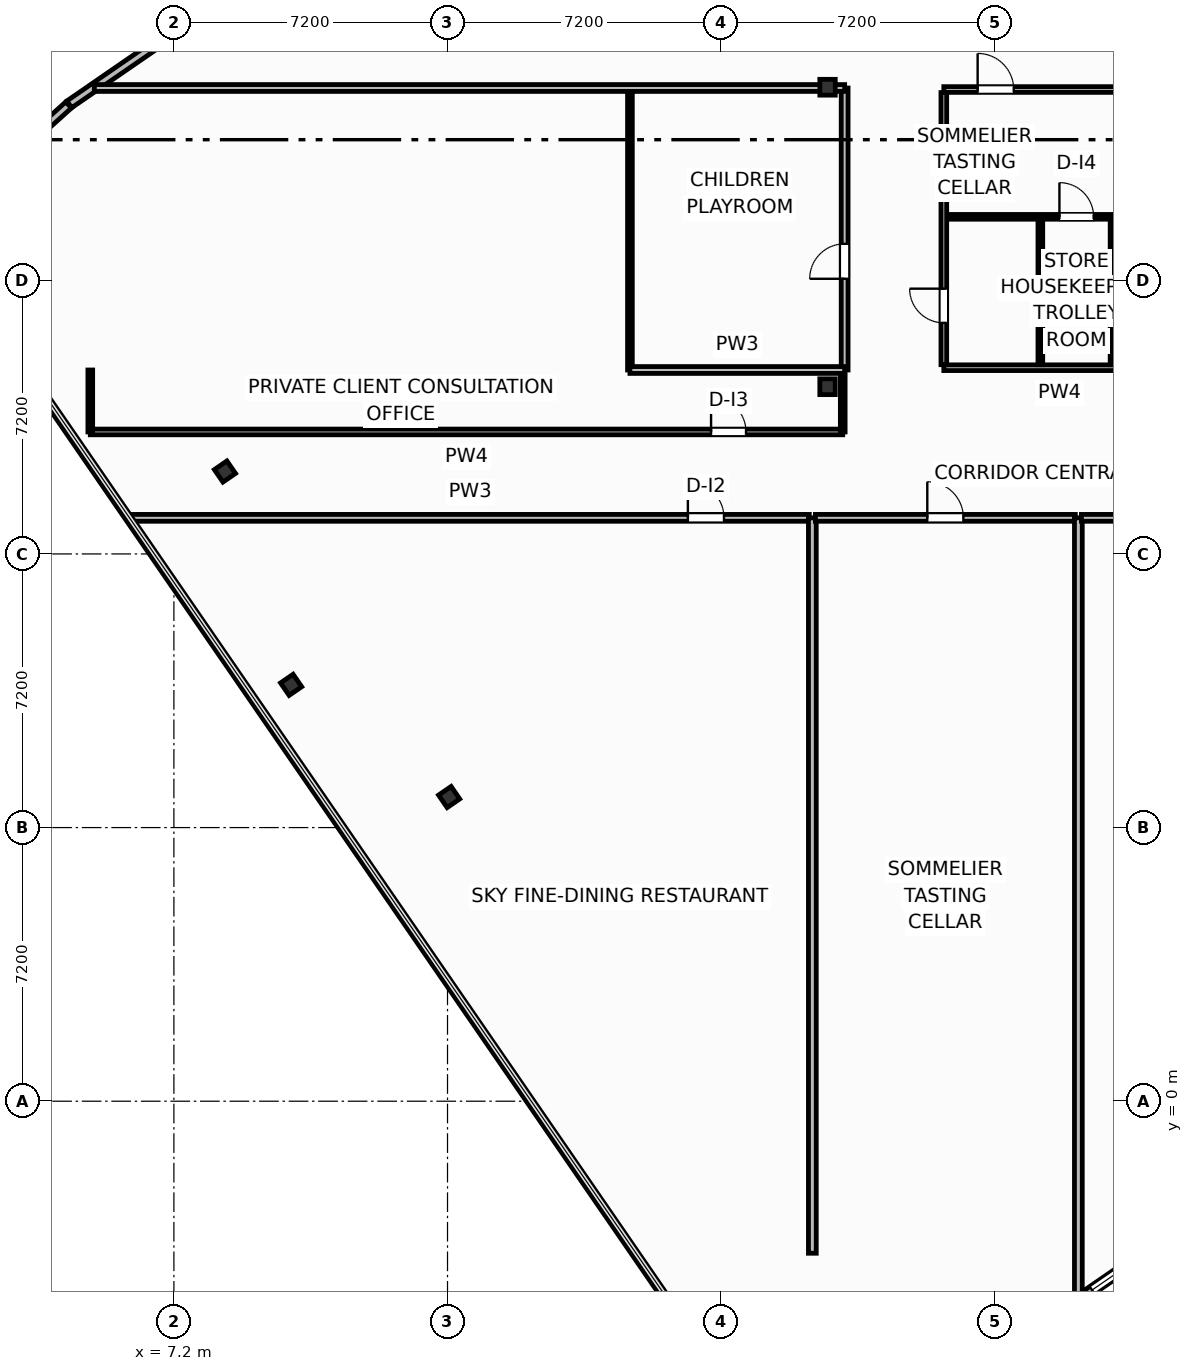
"""IFC4 building model, lengths in metres.
Left out: names, types, materials, properties, quantities, classifications, styles, units other than length and angle.
Written with IfcOpenShell. Run it as: python <this file> out.ifc"""

import sys

from ifc_helpers import new_model, si_unit, direction, frame, frame_2d, origin, origin_2d, place, context, subcontext, project, spatial, rectangle, i_section, extrude, element, fill, save


model = new_model("IFC4")
c1 = context("Model", 3, precision=1e-05, world=origin(), true_north=direction((0.0, 1.0)))
c2 = subcontext(c1, "Body", "Model", "MODEL_VIEW")
j1 = project(units=[si_unit("LENGTHUNIT", "METRE"), si_unit("PLANEANGLEUNIT", "RADIAN")], contexts=[c1])
p1 = place(None, origin())
s1 = spatial("IfcSite", under=j1, at=p1, CompositionType="ELEMENT")
p2 = place(p1, origin())
s2 = spatial("IfcBuilding", under=s1, at=p2, CompositionType="ELEMENT")
p3 = place(p2, frame((0.0, 0.0, 258.2)))
s3 = spatial("IfcBuildingStorey", under=s2, at=p3, CompositionType="ELEMENT", Elevation=258.2)
for number, where, z_axis, x_axis in (
    (1, (24.4, 18.8, 0.0), (0.0, 0.0, 1.0), (1.0, 0.0, 0.0)),
    (2, (24.4, 26.68, 0.0), (0.0, 0.0, 1.0), (1.0, 0.0, 0.0)),
):
    element("IfcColumn", number, at=place(p3, frame(where, z_axis=z_axis, x_axis=x_axis)), inside=s3, PredefinedType="COLUMN", context=c2, shape_type="SweptSolid", body=[
        extrude(i_section(OverallWidth=0.406, OverallDepth=0.416, WebThickness=0.03, FlangeThickness=0.048, FilletRadius=0.025, at=origin_2d()), origin(), (0.0, 0.0, 1.0), 3.7),
    ])
for number, where, z_axis, x_axis in (
    (3, (8.543, 16.569, 0.0), (0.0, 0.0, 1.0), (0.824, 0.567, 0.0)),
    (4, (10.284, 10.956, 0.0), (0.0, 0.0, 1.0), (0.824, 0.567, 0.0)),
    (5, (14.443, 8.004, 0.0), (0.0, 0.0, 1.0), (0.824, 0.567, 0.0)),
):
    element("IfcColumn", number, at=place(p3, frame(where, z_axis=z_axis, x_axis=x_axis)), inside=s3, PredefinedType="COLUMN", context=c2, shape_type="SweptSolid", body=[
        extrude(i_section(OverallWidth=0.401, OverallDepth=0.399, WebThickness=0.025, FlangeThickness=0.04, FilletRadius=0.022, at=origin_2d()), origin(), (0.0, 0.0, 1.0), 3.7),
    ])
p4 = place(p3, frame((27.704, -7.488, 0.0), z_axis=(0.0, 0.0, 1.0), x_axis=(0.823529068157, 0.567274073003, 0.0)))
e6 = element("IfcWall", 6, at=p4, inside=s3, PredefinedType="SOLIDWALL", context=c2, shape_type="SweptSolid", body=[
    extrude(rectangle(XDim=10.98, YDim=0.22, at=frame_2d((5.49, 0.0))), origin(), (0.0, 0.0, 1.0), 2.73),
])
p5 = place(p4, frame((4.44, 0.0, 0.8)))
e7 = element("IfcOpeningElement", 7, at=p5, cuts=e6, PredefinedType="OPENING", context=c2, shape_type="SweptSolid", body=[
    extrude(rectangle(XDim=2.1, YDim=1.75, at=frame_2d((1.05, 0.875))), frame((0.0, 0.12, 0.0), z_axis=(0.0, -1.0, 0.0), x_axis=(1.0, 0.0, 0.0)), (0.0, 0.0, 1.0), 0.24),
])
p6 = place(p3, frame((13.408, 32.402, 0.0), z_axis=(0.0, 0.0, 1.0), x_axis=(-0.823527634633, -0.567276154087, 0.0)))
e8 = element("IfcWall", 8, at=p6, inside=s3, PredefinedType="SOLIDWALL", context=c2, shape_type="SweptSolid", body=[
    extrude(rectangle(XDim=10.88, YDim=0.22, at=frame_2d((5.44, 0.0))), origin(), (0.0, 0.0, 1.0), 2.73),
])
p7 = place(p6, frame((4.39, 0.0, 0.8)))
e9 = element("IfcOpeningElement", 9, at=p7, cuts=e8, PredefinedType="OPENING", context=c2, shape_type="SweptSolid", body=[
    extrude(rectangle(XDim=2.1, YDim=1.75, at=frame_2d((1.05, 0.875))), frame((0.0, 0.12, 0.0), z_axis=(0.0, -1.0, 0.0), x_axis=(1.0, 0.0, 0.0)), (0.0, 0.0, 1.0), 0.24),
])
p8 = place(p3, frame((4.429, 26.213, 0.0), z_axis=(0.0, 0.0, 1.0), x_axis=(-0.742414330744, -0.669941013453, 0.0)))
e10 = element("IfcWall", 10, at=p8, inside=s3, PredefinedType="SOLIDWALL", context=c2, shape_type="SweptSolid", body=[
    extrude(rectangle(XDim=1.257, YDim=0.22, at=frame_2d((0.628, 0.0))), origin(), (0.0, 0.0, 1.0), 2.73),
])
p9 = place(p3, frame((5.0, 17.61, 0.0), z_axis=(0.0, 0.0, 1.0), x_axis=(1.0, 0.0, 0.0)))
e11 = element("IfcWall", 11, at=p9, inside=s3, PredefinedType="PARTITIONING", context=c2, shape_type="SweptSolid", body=[
    extrude(rectangle(XDim=19.8, YDim=0.15, at=frame_2d((9.9, 0.0))), origin(), (0.0, 0.0, 1.0), 2.739),
])
p10 = place(p9, frame((16.335, 0.0, 0.0)))
e12 = element("IfcOpeningElement", 12, at=p10, cuts=e11, PredefinedType="OPENING", context=c2, shape_type="SweptSolid", body=[
    extrude(rectangle(XDim=0.92, YDim=2.05, at=frame_2d((0.46, 1.025))), frame((0.0, 0.085, 0.0), z_axis=(0.0, -1.0, 0.0), x_axis=(1.0, 0.0, 0.0)), (0.0, 0.0, 1.0), 0.17),
])
for number, where, z_axis, x_axis in (
    (13, (5.0, 17.61, 0.0), (0.0, 0.0, 1.0), (0.0, 1.0, 0.0)),
    (14, (24.8, 17.61, 0.0), (0.0, 0.0, 1.0), (0.0, 1.0, 0.0)),
):
    element("IfcWall", number, at=place(p3, frame(where, z_axis=z_axis, x_axis=x_axis)), inside=s3, PredefinedType="PARTITIONING", context=c2, shape_type="SweptSolid", body=[
        extrude(rectangle(XDim=1.63, YDim=0.125, at=frame_2d((0.815, 0.0))), origin(), (0.0, 0.0, 1.0), 3.45),
    ])
p11 = place(p3, frame((6.071, 15.35, 0.0), z_axis=(0.0, 0.0, 1.0), x_axis=(1.0, 0.0, 0.0)))
e15 = element("IfcWall", 15, at=p11, inside=s3, PredefinedType="PARTITIONING", context=c2, shape_type="SweptSolid", body=[
    extrude(rectangle(XDim=17.849, YDim=0.18, at=frame_2d((8.924, 0.0))), origin(), (0.0, 0.0, 1.0), 3.45),
])
p12 = place(p11, frame((14.654, 0.0, 0.0)))
e16 = element("IfcOpeningElement", 16, at=p12, cuts=e15, PredefinedType="OPENING", context=c2, shape_type="SweptSolid", body=[
    extrude(rectangle(XDim=0.95, YDim=2.05, at=frame_2d((0.475, 1.025))), frame((0.0, 0.1, 0.0), z_axis=(0.0, -1.0, 0.0), x_axis=(1.0, 0.0, 0.0)), (0.0, 0.0, 1.0), 0.2),
])
p13 = place(p3, frame((24.0, -4.0, 0.0), z_axis=(0.0, 0.0, 1.0), x_axis=(0.0, 1.0, 0.0)))
e17 = element("IfcWall", 17, at=p13, inside=s3, PredefinedType="PARTITIONING", context=c2, shape_type="SweptSolid", body=[
    extrude(rectangle(XDim=19.35, YDim=0.205, at=frame_2d((9.675, 0.0))), origin(), (0.0, 0.0, 1.0), 3.45),
])
p14 = place(p3, frame((24.08, 15.35, 0.0), z_axis=(0.0, 0.0, 1.0), x_axis=(1.0, 0.0, 0.0)))
e18 = element("IfcWall", 18, at=p14, inside=s3, PredefinedType="PARTITIONING", context=c2, shape_type="SweptSolid", body=[
    extrude(rectangle(XDim=6.84, YDim=0.18, at=frame_2d((3.42, 0.0))), origin(), (0.0, 0.0, 1.0), 3.45),
])
p15 = place(p14, frame((2.945, 0.0, 0.0)))
e19 = element("IfcOpeningElement", 19, at=p15, cuts=e18, PredefinedType="OPENING", context=c2, shape_type="SweptSolid", body=[
    extrude(rectangle(XDim=0.95, YDim=2.05, at=frame_2d((0.475, 1.025))), frame((0.0, 0.1, 0.0), z_axis=(0.0, -1.0, 0.0), x_axis=(1.0, 0.0, 0.0)), (0.0, 0.0, 1.0), 0.2),
])
p16 = place(p3, frame((31.0, -5.112, 0.0), z_axis=(0.0, 0.0, 1.0), x_axis=(0.0, 1.0, 0.0)))
e20 = element("IfcWall", 20, at=p16, inside=s3, PredefinedType="PARTITIONING", context=c2, shape_type="SweptSolid", body=[
    extrude(rectangle(XDim=20.462, YDim=0.205, at=frame_2d((10.231, 0.0))), origin(), (0.0, 0.0, 1.0), 3.45),
])
p17 = place(p3, frame((31.08, 15.35, 0.0), z_axis=(0.0, 0.0, 1.0), x_axis=(1.0, 0.0, 0.0)))
e21 = element("IfcWall", 21, at=p17, inside=s3, PredefinedType="PARTITIONING", context=c2, shape_type="SweptSolid", body=[
    extrude(rectangle(XDim=6.84, YDim=0.18, at=frame_2d((3.42, 0.0))), origin(), (0.0, 0.0, 1.0), 3.45),
])
p18 = place(p17, frame((2.945, 0.0, 0.0)))
e22 = element("IfcOpeningElement", 22, at=p18, cuts=e21, PredefinedType="OPENING", context=c2, shape_type="SweptSolid", body=[
    extrude(rectangle(XDim=0.95, YDim=2.05, at=frame_2d((0.475, 1.025))), frame((0.0, 0.1, 0.0), z_axis=(0.0, -1.0, 0.0), x_axis=(1.0, 0.0, 0.0)), (0.0, 0.0, 1.0), 0.2),
])
p19 = place(p3, frame((24.85, 19.24, 0.0), z_axis=(0.0, 0.0, 1.0), x_axis=(0.0, 1.0, 0.0)))
e23 = element("IfcWall", 23, at=p19, inside=s3, PredefinedType="PARTITIONING", context=c2, shape_type="SweptSolid", body=[
    extrude(rectangle(XDim=7.42, YDim=0.18, at=frame_2d((3.71, 0.0))), origin(), (0.0, 0.0, 1.0), 3.45),
])
p20 = place(p19, frame((2.4, 0.0, 0.0)))
e24 = element("IfcOpeningElement", 24, at=p20, cuts=e23, PredefinedType="OPENING", context=c2, shape_type="SweptSolid", body=[
    extrude(rectangle(XDim=0.92, YDim=2.05, at=frame_2d((0.46, 1.025))), frame((0.0, 0.1, 0.0), z_axis=(0.0, -1.0, 0.0), x_axis=(1.0, 0.0, 0.0)), (0.0, 0.0, 1.0), 0.2),
])
p21 = place(p3, frame((19.2, 19.24, 0.0), z_axis=(0.0, 0.0, 1.0), x_axis=(0.0, 1.0, 0.0)))
e25 = element("IfcWall", 25, at=p21, inside=s3, PredefinedType="PARTITIONING", context=c2, shape_type="SweptSolid", body=[
    extrude(rectangle(XDim=7.42, YDim=0.125, at=frame_2d((3.71, 0.0))), origin(), (0.0, 0.0, 1.0), 3.45),
])
p22 = place(p3, frame((19.2, 19.24, 0.0), z_axis=(0.0, 0.0, 1.0), x_axis=(1.0, 0.0, 0.0)))
e26 = element("IfcWall", 26, at=p22, inside=s3, PredefinedType="PARTITIONING", context=c2, shape_type="SweptSolid", body=[
    extrude(rectangle(XDim=5.65, YDim=0.18, at=frame_2d((2.825, 0.0))), origin(), (0.0, 0.0, 1.0), 3.45),
])
p23 = place(p3, frame((5.107, 26.66, 0.0), z_axis=(0.0, 0.0, 1.0), x_axis=(1.0, 0.0, 0.0)))
e27 = element("IfcWall", 27, at=p23, inside=s3, PredefinedType="PARTITIONING", context=c2, shape_type="SweptSolid", body=[
    extrude(rectangle(XDim=19.743, YDim=0.18, at=frame_2d((9.872, 0.0))), origin(), (0.0, 0.0, 1.0), 2.662),
])
p24 = place(p3, frame((27.46, 26.62, 0.0), z_axis=(0.0, 0.0, 1.0), x_axis=(1.0, 0.0, 0.0)))
e28 = element("IfcWall", 28, at=p24, inside=s3, PredefinedType="PARTITIONING", context=c2, shape_type="SweptSolid", body=[
    extrude(rectangle(XDim=6.1, YDim=0.15, at=frame_2d((3.05, 0.0))), origin(), (0.0, 0.0, 1.0), 2.662),
])
p25 = place(p24, frame((0.89, 0.0, 0.0)))
e29 = element("IfcOpeningElement", 29, at=p25, cuts=e28, PredefinedType="OPENING", context=c2, shape_type="SweptSolid", body=[
    extrude(rectangle(XDim=0.95, YDim=2.05, at=frame_2d((0.475, 1.025))), frame((0.0, 0.085, 0.0), z_axis=(0.0, -1.0, 0.0), x_axis=(1.0, 0.0, 0.0)), (0.0, 0.0, 1.0), 0.17),
])
p26 = place(p3, frame((27.46, 19.3, 0.0), z_axis=(0.0, 0.0, 1.0), x_axis=(1.0, 0.0, 0.0)))
e30 = element("IfcWall", 30, at=p26, inside=s3, PredefinedType="PARTITIONING", context=c2, shape_type="SweptSolid", body=[
    extrude(rectangle(XDim=6.1, YDim=0.15, at=frame_2d((3.05, 0.0))), origin(), (0.0, 0.0, 1.0), 2.662),
])
p27 = place(p3, frame((27.52, 23.27, 0.0), z_axis=(0.0, 0.0, 1.0), x_axis=(1.0, 0.0, 0.0)))
e31 = element("IfcWall", 31, at=p27, inside=s3, PredefinedType="PARTITIONING", context=c2, shape_type="SweptSolid", body=[
    extrude(rectangle(XDim=6.0, YDim=0.125, at=frame_2d((3.0, 0.0))), origin(), (0.0, 0.0, 1.0), 3.45),
])
p28 = place(p27, frame((2.982, 0.0, 0.0)))
e32 = element("IfcOpeningElement", 32, at=p28, cuts=e31, PredefinedType="OPENING", context=c2, shape_type="SweptSolid", body=[
    extrude(rectangle(XDim=0.9, YDim=2.05, at=frame_2d((0.45, 1.025))), frame((0.0, 0.073, 0.0), z_axis=(0.0, -1.0, 0.0), x_axis=(1.0, 0.0, 0.0)), (0.0, 0.0, 1.0), 0.145),
])
p29 = place(p27, frame((4.65, 0.0, 0.0)))
e33 = element("IfcOpeningElement", 33, at=p29, cuts=e31, PredefinedType="OPENING", context=c2, shape_type="SweptSolid", body=[
    extrude(rectangle(XDim=0.85, YDim=2.05, at=frame_2d((0.425, 1.025))), frame((0.0, 0.073, 0.0), z_axis=(0.0, -1.0, 0.0), x_axis=(1.0, 0.0, 0.0)), (0.0, 0.0, 1.0), 0.145),
])
for number, where, z_axis, x_axis in (
    (34, (30.0, 19.38, 0.0), (0.0, 0.0, 1.0), (0.0, 1.0, 0.0)),
    (35, (31.9, 19.38, 0.0), (0.0, 0.0, 1.0), (0.0, 1.0, 0.0)),
):
    element("IfcWall", number, at=place(p3, frame(where, z_axis=z_axis, x_axis=x_axis)), inside=s3, PredefinedType="PARTITIONING", context=c2, shape_type="SweptSolid", body=[
        extrude(rectangle(XDim=3.82, YDim=0.125, at=frame_2d((1.91, 0.0))), origin(), (0.0, 0.0, 1.0), 3.45),
    ])
p30 = place(p3, frame((27.46, 19.38, 0.0), z_axis=(0.0, 0.0, 1.0), x_axis=(0.0, 1.0, 0.0)))
e36 = element("IfcWall", 36, at=p30, inside=s3, PredefinedType="PARTITIONING", context=c2, shape_type="SweptSolid", body=[
    extrude(rectangle(XDim=7.16, YDim=0.15, at=frame_2d((3.58, 0.0))), origin(), (0.0, 0.0, 1.0), 3.45),
])
p31 = place(p30, frame((1.1, 0.0, 0.0)))
e37 = element("IfcOpeningElement", 37, at=p31, cuts=e36, PredefinedType="OPENING", context=c2, shape_type="SweptSolid", body=[
    extrude(rectangle(XDim=0.9, YDim=2.05, at=frame_2d((0.45, 1.025))), frame((0.0, 0.085, 0.0), z_axis=(0.0, -1.0, 0.0), x_axis=(1.0, 0.0, 0.0)), (0.0, 0.0, 1.0), 0.17),
])
p32 = place(p5, origin())
e38 = element("IfcWindow", 38, at=p32, inside=s3, PartitioningType="SINGLE_PANEL", PredefinedType="WINDOW", context=c2, shape_type="SweptSolid", body=[
    extrude(rectangle(XDim=2.1, YDim=1.75, at=frame_2d((1.05, 0.875))), frame((0.0, 0.03, 0.0), z_axis=(0.0, -1.0, 0.0), x_axis=(1.0, 0.0, 0.0)), (0.0, 0.0, 1.0), 0.06),
])
fill(e7, e38)
p33 = place(p10, origin())
e39 = element("IfcDoor", 39, at=p33, inside=s3, OperationType="SINGLE_SWING_LEFT", PredefinedType="DOOR", context=c2, shape_type="SweptSolid", body=[
    extrude(rectangle(XDim=0.92, YDim=2.05, at=frame_2d((0.46, 1.025))), frame((0.0, 0.025, 0.0), z_axis=(0.0, -1.0, 0.0), x_axis=(1.0, 0.0, 0.0)), (0.0, 0.0, 1.0), 0.05),
])
fill(e12, e39)
p34 = place(p12, origin())
e40 = element("IfcDoor", 40, at=p34, inside=s3, OperationType="SINGLE_SWING_LEFT", PredefinedType="DOOR", context=c2, shape_type="SweptSolid", body=[
    extrude(rectangle(XDim=0.95, YDim=2.05, at=frame_2d((0.475, 1.025))), frame((0.0, 0.025, 0.0), z_axis=(0.0, -1.0, 0.0), x_axis=(1.0, 0.0, 0.0)), (0.0, 0.0, 1.0), 0.05),
])
fill(e16, e40)
p35 = place(p15, origin())
e41 = element("IfcDoor", 41, at=p35, inside=s3, OperationType="SINGLE_SWING_LEFT", PredefinedType="DOOR", context=c2, shape_type="SweptSolid", body=[
    extrude(rectangle(XDim=0.95, YDim=2.05, at=frame_2d((0.475, 1.025))), frame((0.0, 0.025, 0.0), z_axis=(0.0, -1.0, 0.0), x_axis=(1.0, 0.0, 0.0)), (0.0, 0.0, 1.0), 0.05),
])
fill(e19, e41)
p36 = place(p20, origin())
e42 = element("IfcDoor", 42, at=p36, inside=s3, OperationType="SINGLE_SWING_LEFT", PredefinedType="DOOR", context=c2, shape_type="SweptSolid", body=[
    extrude(rectangle(XDim=0.92, YDim=2.05, at=frame_2d((0.46, 1.025))), frame((0.0, 0.025, 0.0), z_axis=(0.0, -1.0, 0.0), x_axis=(1.0, 0.0, 0.0)), (0.0, 0.0, 1.0), 0.05),
])
fill(e24, e42)
p37 = place(p25, origin())
e43 = element("IfcDoor", 43, at=p37, inside=s3, OperationType="SINGLE_SWING_LEFT", PredefinedType="DOOR", context=c2, shape_type="SweptSolid", body=[
    extrude(rectangle(XDim=0.95, YDim=2.05, at=frame_2d((0.475, 1.025))), frame((0.0, 0.025, 0.0), z_axis=(0.0, -1.0, 0.0), x_axis=(1.0, 0.0, 0.0)), (0.0, 0.0, 1.0), 0.05),
])
fill(e29, e43)
p38 = place(p28, origin())
e44 = element("IfcDoor", 44, at=p38, inside=s3, OperationType="SINGLE_SWING_LEFT", PredefinedType="DOOR", context=c2, shape_type="SweptSolid", body=[
    extrude(rectangle(XDim=0.9, YDim=2.05, at=frame_2d((0.45, 1.025))), frame((0.0, 0.025, 0.0), z_axis=(0.0, -1.0, 0.0), x_axis=(1.0, 0.0, 0.0)), (0.0, 0.0, 1.0), 0.05),
])
fill(e32, e44)
p39 = place(p31, origin())
e45 = element("IfcDoor", 45, at=p39, inside=s3, OperationType="SINGLE_SWING_RIGHT", PredefinedType="DOOR", context=c2, shape_type="SweptSolid", body=[
    extrude(rectangle(XDim=0.9, YDim=2.05, at=frame_2d((0.45, 1.025))), frame((0.0, 0.025, 0.0), z_axis=(0.0, -1.0, 0.0), x_axis=(1.0, 0.0, 0.0)), (0.0, 0.0, 1.0), 0.05),
])
fill(e37, e45)
save(model, sys.argv[1])
